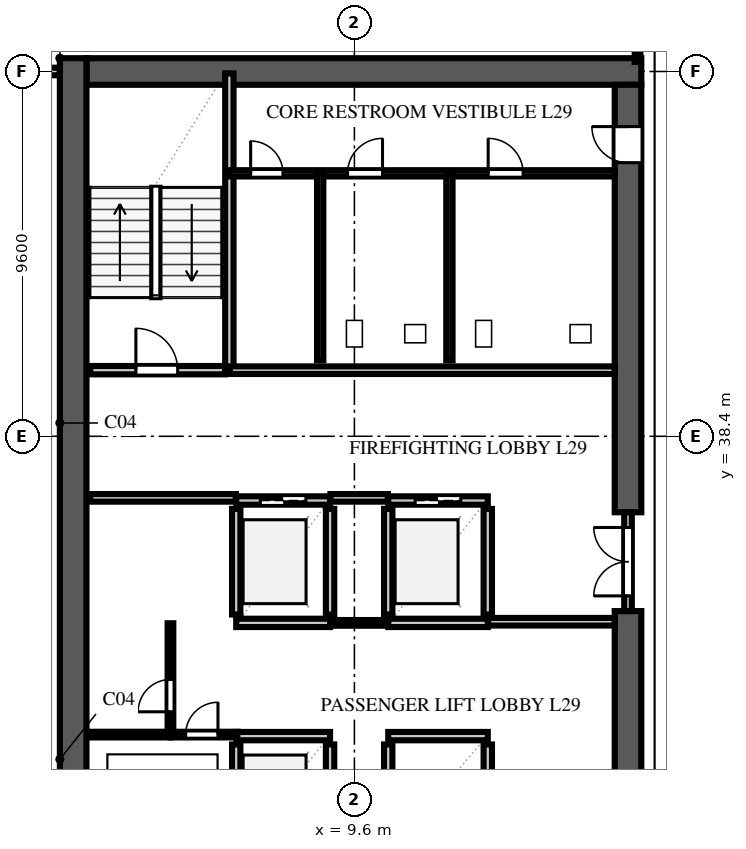
"""IFC4 building model, lengths in metres.
Left out: names, types, materials, properties, quantities, classifications, styles, units other than length and angle.
Written with IfcOpenShell. Run it as: python <this file> out.ifc"""

import sys

from ifc_helpers import new_model, si_unit, direction, frame, frame_2d, origin, place, context, subcontext, project, spatial, rectangle, extrude, element, fill, save


model = new_model("IFC4")
c1 = context("Model", 3, precision=1e-05, world=origin(), true_north=direction((0.0, 1.0)))
c2 = subcontext(c1, "Body", "Model", "MODEL_VIEW")
j1 = project(units=[si_unit("LENGTHUNIT", "METRE"), si_unit("PLANEANGLEUNIT", "RADIAN")], contexts=[c1])
p1 = place(None, origin())
s1 = spatial("IfcSite", under=j1, at=p1, CompositionType="ELEMENT")
p2 = place(p1, origin())
s2 = spatial("IfcBuilding", under=s1, at=p2, CompositionType="ELEMENT")
p3 = place(p2, frame((0.0, 0.0, 116.6)))
s3 = spatial("IfcBuildingStorey", under=s2, at=p3, CompositionType="ELEMENT", Elevation=116.6)
p4 = place(p3, frame((2.55, 48.0, 0.0), z_axis=(0.0, 0.0, 1.0), x_axis=(1.0, 0.0, 0.0)))
e1 = element("IfcWall", 1, at=p4, inside=s3, PredefinedType="SHEAR", context=c2, shape_type="SweptSolid", body=[
    extrude(rectangle(XDim=14.6, YDim=0.7, at=frame_2d((7.3, 0.0))), origin(), (0.0, 0.0, 1.0), 3.54),
])
p5 = place(p3, frame((2.2, 9.25, 0.0), z_axis=(0.0, 0.0, 1.0), x_axis=(0.0, 1.0, 0.0)))
e2 = element("IfcWall", 2, at=p5, inside=s3, PredefinedType="SHEAR", context=c2, shape_type="SweptSolid", body=[
    extrude(rectangle(XDim=39.1, YDim=0.7, at=frame_2d((19.55, 0.0))), origin(), (0.0, 0.0, 1.0), 3.54),
])
p6 = place(p3, frame((16.8, 26.0, 0.0), z_axis=(0.0, 0.0, 1.0), x_axis=(0.0, 1.0, 0.0)))
e3 = element("IfcWall", 3, at=p6, inside=s3, PredefinedType="SHEAR", context=c2, shape_type="SweptSolid", body=[
    extrude(rectangle(XDim=7.8, YDim=0.7, at=frame_2d((3.9, 0.0))), origin(), (0.0, 0.0, 1.0), 3.54),
])
p7 = place(p3, frame((16.8, 36.4, 0.0), z_axis=(0.0, 0.0, 1.0), x_axis=(0.0, 1.0, 0.0)))
e4 = element("IfcWall", 4, at=p7, inside=s3, PredefinedType="SHEAR", context=c2, shape_type="SweptSolid", body=[
    extrude(rectangle(XDim=11.25, YDim=0.7, at=frame_2d((5.625, 0.0))), origin(), (0.0, 0.0, 1.0), 3.54),
])
p8 = place(p7, frame((9.2, 0.0, 0.0)))
e5 = element("IfcOpeningElement", 5, at=p8, cuts=e4, PredefinedType="OPENING", context=c2, shape_type="SweptSolid", body=[
    extrude(rectangle(XDim=0.95, YDim=2.15, at=frame_2d((0.475, 1.075))), frame((0.0, 0.362, 0.0), z_axis=(0.0, -1.0, 0.0), x_axis=(1.0, 0.0, 0.0)), (0.0, 0.0, 1.0), 0.724),
])
p9 = place(p3, frame((2.65, 40.14, 0.0), z_axis=(0.0, 0.0, 1.0), x_axis=(1.0, 0.0, 0.0)))
e6 = element("IfcWall", 6, at=p9, inside=s3, PredefinedType="SOLIDWALL", context=c2, shape_type="SweptSolid", body=[
    extrude(rectangle(XDim=3.55, YDim=0.22, at=frame_2d((1.775, 0.0))), origin(), (0.0, 0.0, 1.0), 3.54),
])
p10 = place(p9, frame((1.2, 0.0, 0.0)))
e7 = element("IfcOpeningElement", 7, at=p10, cuts=e6, PredefinedType="OPENING", context=c2, shape_type="SweptSolid", body=[
    extrude(rectangle(XDim=1.1, YDim=2.2, at=frame_2d((0.55, 1.1))), frame((0.0, 0.122, 0.0), z_axis=(0.0, -1.0, 0.0), x_axis=(1.0, 0.0, 0.0)), (0.0, 0.0, 1.0), 0.244),
])
p11 = place(p3, frame((6.31, 40.14, 0.0), z_axis=(0.0, 0.0, 1.0), x_axis=(0.0, 1.0, 0.0)))
e8 = element("IfcWall", 8, at=p11, inside=s3, PredefinedType="SOLIDWALL", context=c2, shape_type="SweptSolid", body=[
    extrude(rectangle(XDim=7.81, YDim=0.22, at=frame_2d((3.905, 0.0))), origin(), (0.0, 0.0, 1.0), 3.54),
])
p12 = place(p3, frame((6.49, 27.71, 0.0), z_axis=(0.0, 0.0, 1.0), x_axis=(0.0, 1.0, 0.0)))
e9 = element("IfcWall", 9, at=p12, inside=s3, PredefinedType="SOLIDWALL", context=c2, shape_type="SweptSolid", body=[
    extrude(rectangle(XDim=2.58, YDim=0.22, at=frame_2d((1.29, 0.0))), origin(), (0.0, 0.0, 1.0), 3.54),
])
p13 = place(p3, frame((8.96, 27.71, 0.0), z_axis=(0.0, 0.0, 1.0), x_axis=(0.0, 1.0, 0.0)))
e10 = element("IfcWall", 10, at=p13, inside=s3, PredefinedType="SOLIDWALL", context=c2, shape_type="SweptSolid", body=[
    extrude(rectangle(XDim=2.58, YDim=0.22, at=frame_2d((1.29, 0.0))), origin(), (0.0, 0.0, 1.0), 3.54),
])
p14 = place(p13, frame((0.74, 0.0, 0.0)))
e11 = element("IfcOpeningElement", 11, at=p14, cuts=e10, PredefinedType="OPENING", context=c2, shape_type="SweptSolid", body=[
    extrude(rectangle(XDim=1.1, YDim=2.2, at=frame_2d((0.55, 1.1))), frame((0.0, 0.122, 0.0), z_axis=(0.0, -1.0, 0.0), x_axis=(1.0, 0.0, 0.0)), (0.0, 0.0, 1.0), 0.244),
])
p15 = place(p3, frame((6.49, 30.51, 0.0), z_axis=(0.0, 0.0, 1.0), x_axis=(1.0, 0.0, 0.0)))
e12 = element("IfcWall", 12, at=p15, inside=s3, PredefinedType="SOLIDWALL", context=c2, shape_type="SweptSolid", body=[
    extrude(rectangle(XDim=2.47, YDim=0.22, at=frame_2d((1.235, 0.0))), origin(), (0.0, 0.0, 1.0), 3.54),
])
for number, where, z_axis, x_axis in (
    (13, (10.49, 27.71, 0.0), (0.0, 0.0, 1.0), (0.0, 1.0, 0.0)),
    (14, (13.11, 27.71, 0.0), (0.0, 0.0, 1.0), (0.0, 1.0, 0.0)),
):
    element("IfcWall", number, at=place(p3, frame(where, z_axis=z_axis, x_axis=x_axis)), inside=s3, PredefinedType="SOLIDWALL", context=c2, shape_type="SweptSolid", body=[
        extrude(rectangle(XDim=2.58, YDim=0.22, at=frame_2d((1.29, 0.0))), origin(), (0.0, 0.0, 1.0), 3.54),
    ])
p16 = place(p3, frame((10.49, 30.51, 0.0), z_axis=(0.0, 0.0, 1.0), x_axis=(1.0, 0.0, 0.0)))
e15 = element("IfcWall", 15, at=p16, inside=s3, PredefinedType="SOLIDWALL", context=c2, shape_type="SweptSolid", body=[
    extrude(rectangle(XDim=2.62, YDim=0.22, at=frame_2d((1.31, 0.0))), origin(), (0.0, 0.0, 1.0), 3.54),
])
for number, where, z_axis, x_axis in (
    (16, (6.49, 33.71, 0.0), (0.0, 0.0, 1.0), (0.0, 1.0, 0.0)),
    (17, (8.96, 33.71, 0.0), (0.0, 0.0, 1.0), (0.0, 1.0, 0.0)),
):
    element("IfcWall", number, at=place(p3, frame(where, z_axis=z_axis, x_axis=x_axis)), inside=s3, PredefinedType="SOLIDWALL", context=c2, shape_type="SweptSolid", body=[
        extrude(rectangle(XDim=2.78, YDim=0.22, at=frame_2d((1.39, 0.0))), origin(), (0.0, 0.0, 1.0), 3.54),
    ])
p17 = place(p3, frame((6.49, 33.49, 0.0), z_axis=(0.0, 0.0, 1.0), x_axis=(1.0, 0.0, 0.0)))
e18 = element("IfcWall", 18, at=p17, inside=s3, PredefinedType="SOLIDWALL", context=c2, shape_type="SweptSolid", body=[
    extrude(rectangle(XDim=2.47, YDim=0.22, at=frame_2d((1.235, 0.0))), origin(), (0.0, 0.0, 1.0), 3.54),
])
p18 = place(p3, frame((6.49, 36.71, 0.0), z_axis=(0.0, 0.0, 1.0), x_axis=(1.0, 0.0, 0.0)))
e19 = element("IfcWall", 19, at=p18, inside=s3, PredefinedType="SOLIDWALL", context=c2, shape_type="SweptSolid", body=[
    extrude(rectangle(XDim=2.47, YDim=0.22, at=frame_2d((1.235, 0.0))), origin(), (0.0, 0.0, 1.0), 3.54),
])
p19 = place(p18, frame((0.635, 0.0, 0.0)))
e20 = element("IfcOpeningElement", 20, at=p19, cuts=e19, PredefinedType="OPENING", context=c2, shape_type="SweptSolid", body=[
    extrude(rectangle(XDim=1.2, YDim=2.2, at=frame_2d((0.6, 1.1))), frame((0.0, 0.122, 0.0), z_axis=(0.0, -1.0, 0.0), x_axis=(1.0, 0.0, 0.0)), (0.0, 0.0, 1.0), 0.244),
])
for number, where, z_axis, x_axis in (
    (21, (10.49, 33.71, 0.0), (0.0, 0.0, 1.0), (0.0, 1.0, 0.0)),
    (22, (13.11, 33.71, 0.0), (0.0, 0.0, 1.0), (0.0, 1.0, 0.0)),
):
    element("IfcWall", number, at=place(p3, frame(where, z_axis=z_axis, x_axis=x_axis)), inside=s3, PredefinedType="SOLIDWALL", context=c2, shape_type="SweptSolid", body=[
        extrude(rectangle(XDim=2.78, YDim=0.22, at=frame_2d((1.39, 0.0))), origin(), (0.0, 0.0, 1.0), 3.54),
    ])
p20 = place(p3, frame((10.49, 33.49, 0.0), z_axis=(0.0, 0.0, 1.0), x_axis=(1.0, 0.0, 0.0)))
e23 = element("IfcWall", 23, at=p20, inside=s3, PredefinedType="SOLIDWALL", context=c2, shape_type="SweptSolid", body=[
    extrude(rectangle(XDim=2.62, YDim=0.22, at=frame_2d((1.31, 0.0))), origin(), (0.0, 0.0, 1.0), 3.54),
])
p21 = place(p3, frame((10.49, 36.71, 0.0), z_axis=(0.0, 0.0, 1.0), x_axis=(1.0, 0.0, 0.0)))
e24 = element("IfcWall", 24, at=p21, inside=s3, PredefinedType="SOLIDWALL", context=c2, shape_type="SweptSolid", body=[
    extrude(rectangle(XDim=2.62, YDim=0.22, at=frame_2d((1.31, 0.0))), origin(), (0.0, 0.0, 1.0), 3.54),
])
p22 = place(p21, frame((0.71, 0.0, 0.0)))
e25 = element("IfcOpeningElement", 25, at=p22, cuts=e24, PredefinedType="OPENING", context=c2, shape_type="SweptSolid", body=[
    extrude(rectangle(XDim=1.2, YDim=2.2, at=frame_2d((0.6, 1.1))), frame((0.0, 0.122, 0.0), z_axis=(0.0, -1.0, 0.0), x_axis=(1.0, 0.0, 0.0)), (0.0, 0.0, 1.0), 0.244),
])
p23 = place(p3, frame((2.65, 36.78, 0.0), z_axis=(0.0, 0.0, 1.0), x_axis=(1.0, 0.0, 0.0)))
e26 = element("IfcWall", 26, at=p23, inside=s3, PredefinedType="SOLIDWALL", context=c2, shape_type="SweptSolid", body=[
    extrude(rectangle(XDim=3.83, YDim=0.2, at=frame_2d((1.915, 0.0))), origin(), (0.0, 0.0, 1.0), 3.54),
])
p24 = place(p3, frame((8.97, 36.78, 0.0), z_axis=(0.0, 0.0, 1.0), x_axis=(1.0, 0.0, 0.0)))
e27 = element("IfcWall", 27, at=p24, inside=s3, PredefinedType="SOLIDWALL", context=c2, shape_type="SweptSolid", body=[
    extrude(rectangle(XDim=1.51, YDim=0.2, at=frame_2d((0.755, 0.0))), origin(), (0.0, 0.0, 1.0), 3.54),
])
p25 = place(p3, frame((13.12, 33.52, 0.0), z_axis=(0.0, 0.0, 1.0), x_axis=(1.0, 0.0, 0.0)))
e28 = element("IfcWall", 28, at=p25, inside=s3, PredefinedType="SOLIDWALL", context=c2, shape_type="SweptSolid", body=[
    extrude(rectangle(XDim=3.33, YDim=0.2, at=frame_2d((1.665, 0.0))), origin(), (0.0, 0.0, 1.0), 3.54),
])
p26 = place(p3, frame((6.32, 40.14, 0.0), z_axis=(0.0, 0.0, 1.0), x_axis=(1.0, 0.0, 0.0)))
e29 = element("IfcWall", 29, at=p26, inside=s3, PredefinedType="SOLIDWALL", context=c2, shape_type="SweptSolid", body=[
    extrude(rectangle(XDim=10.13, YDim=0.2, at=frame_2d((5.065, 0.0))), origin(), (0.0, 0.0, 1.0), 3.54),
])
p27 = place(p3, frame((16.8, 33.8, 0.0), z_axis=(0.0, 0.0, 1.0), x_axis=(0.0, 1.0, 0.0)))
e30 = element("IfcWall", 30, at=p27, inside=s3, PredefinedType="SOLIDWALL", context=c2, shape_type="SweptSolid", body=[
    extrude(rectangle(XDim=2.6, YDim=0.2, at=frame_2d((1.3, 0.0))), origin(), (0.0, 0.0, 1.0), 3.54),
])
p28 = place(p27, frame((0.4, 0.0, 0.0)))
e31 = element("IfcOpeningElement", 31, at=p28, cuts=e30, PredefinedType="OPENING", context=c2, shape_type="SweptSolid", body=[
    extrude(rectangle(XDim=1.8, YDim=2.2, at=frame_2d((0.9, 1.1))), frame((0.0, 0.112, 0.0), z_axis=(0.0, -1.0, 0.0), x_axis=(1.0, 0.0, 0.0)), (0.0, 0.0, 1.0), 0.224),
])
p29 = place(p3, frame((8.965, 33.49, 0.0), z_axis=(0.0, 0.0, 1.0), x_axis=(1.0, 0.0, 0.0)))
e32 = element("IfcWall", 32, at=p29, inside=s3, PredefinedType="PARTITIONING", context=c2, shape_type="SweptSolid", body=[
    extrude(rectangle(XDim=1.52, YDim=0.15, at=frame_2d((0.76, 0.0))), origin(), (0.0, 0.0, 1.0), 3.54),
])
p30 = place(p3, frame((4.76, 30.55, 0.0), z_axis=(0.0, 0.0, 1.0), x_axis=(0.0, 1.0, 0.0)))
e33 = element("IfcWall", 33, at=p30, inside=s3, PredefinedType="PARTITIONING", context=c2, shape_type="SweptSolid", body=[
    extrude(rectangle(XDim=2.93, YDim=0.15, at=frame_2d((1.465, 0.0))), origin(), (0.0, 0.0, 1.0), 3.54),
])
p31 = place(p30, frame((0.6, 0.0, 0.0)))
e34 = element("IfcOpeningElement", 34, at=p31, cuts=e33, PredefinedType="OPENING", context=c2, shape_type="SweptSolid", body=[
    extrude(rectangle(XDim=0.85, YDim=2.1, at=frame_2d((0.425, 1.05))), frame((0.0, 0.087, 0.0), z_axis=(0.0, -1.0, 0.0), x_axis=(1.0, 0.0, 0.0)), (0.0, 0.0, 1.0), 0.174),
])
p32 = place(p3, frame((4.76, 30.55, 0.0), z_axis=(0.0, 0.0, 1.0), x_axis=(1.0, 0.0, 0.0)))
e35 = element("IfcWall", 35, at=p32, inside=s3, PredefinedType="PARTITIONING", context=c2, shape_type="SweptSolid", body=[
    extrude(rectangle(XDim=1.76, YDim=0.15, at=frame_2d((0.88, 0.0))), origin(), (0.0, 0.0, 1.0), 3.54),
])
p33 = place(p32, frame((0.4, 0.0, 0.0)))
e36 = element("IfcOpeningElement", 36, at=p33, cuts=e35, PredefinedType="OPENING", context=c2, shape_type="SweptSolid", body=[
    extrude(rectangle(XDim=0.85, YDim=2.1, at=frame_2d((0.425, 1.05))), frame((0.0, 0.087, 0.0), z_axis=(0.0, -1.0, 0.0), x_axis=(1.0, 0.0, 0.0)), (0.0, 0.0, 1.0), 0.174),
])
p34 = place(p3, frame((2.65, 30.55, 0.0), z_axis=(0.0, 0.0, 1.0), x_axis=(1.0, 0.0, 0.0)))
e37 = element("IfcWall", 37, at=p34, inside=s3, PredefinedType="PARTITIONING", context=c2, shape_type="SweptSolid", body=[
    extrude(rectangle(XDim=2.11, YDim=0.15, at=frame_2d((1.055, 0.0))), origin(), (0.0, 0.0, 1.0), 3.54),
])
p35 = place(p3, frame((6.32, 45.32, 0.0), z_axis=(0.0, 0.0, 1.0), x_axis=(1.0, 0.0, 0.0)))
e38 = element("IfcWall", 38, at=p35, inside=s3, PredefinedType="PLUMBINGWALL", context=c2, shape_type="SweptSolid", body=[
    extrude(rectangle(XDim=10.13, YDim=0.165, at=frame_2d((5.065, 0.0))), origin(), (0.0, 0.0, 1.0), 3.54),
])
p36 = place(p35, frame((0.55, 0.0, 0.0)))
e39 = element("IfcOpeningElement", 39, at=p36, cuts=e38, PredefinedType="OPENING", context=c2, shape_type="SweptSolid", body=[
    extrude(rectangle(XDim=0.85, YDim=2.1, at=frame_2d((0.425, 1.05))), frame((0.0, 0.094, 0.0), z_axis=(0.0, -1.0, 0.0), x_axis=(1.0, 0.0, 0.0)), (0.0, 0.0, 1.0), 0.189),
])
p37 = place(p35, frame((3.1, 0.0, 0.0)))
e40 = element("IfcOpeningElement", 40, at=p37, cuts=e38, PredefinedType="OPENING", context=c2, shape_type="SweptSolid", body=[
    extrude(rectangle(XDim=0.92, YDim=2.15, at=frame_2d((0.46, 1.075))), frame((0.0, 0.094, 0.0), z_axis=(0.0, -1.0, 0.0), x_axis=(1.0, 0.0, 0.0)), (0.0, 0.0, 1.0), 0.189),
])
p38 = place(p35, frame((6.8, 0.0, 0.0)))
e41 = element("IfcOpeningElement", 41, at=p38, cuts=e38, PredefinedType="OPENING", context=c2, shape_type="SweptSolid", body=[
    extrude(rectangle(XDim=0.92, YDim=2.15, at=frame_2d((0.46, 1.075))), frame((0.0, 0.094, 0.0), z_axis=(0.0, -1.0, 0.0), x_axis=(1.0, 0.0, 0.0)), (0.0, 0.0, 1.0), 0.189),
])
for number, where, z_axis, x_axis in (
    (42, (8.7, 40.4, 0.0), (0.0, 0.0, 1.0), (0.0, 1.0, 0.0)),
    (43, (12.1, 40.4, 0.0), (0.0, 0.0, 1.0), (0.0, 1.0, 0.0)),
):
    element("IfcWall", number, at=place(p3, frame(where, z_axis=z_axis, x_axis=x_axis)), inside=s3, PredefinedType="PLUMBINGWALL", context=c2, shape_type="SweptSolid", body=[
        extrude(rectangle(XDim=4.92, YDim=0.165, at=frame_2d((2.46, 0.0))), origin(), (0.0, 0.0, 1.0), 3.54),
    ])
p39 = place(p3, frame((0.85, 48.0, 0.0), z_axis=(0.0, 0.0, 1.0), x_axis=(1.0, 0.0, 0.0)))
e44 = element("IfcWall", 44, at=p39, inside=s3, PredefinedType="SOLIDWALL", context=c2, shape_type="SweptSolid", body=[
    extrude(rectangle(XDim=0.995, YDim=0.2, at=frame_2d((0.498, 0.0))), origin(), (0.0, 0.0, 1.0), 3.54),
])
p40 = place(p3, frame((17.05, 48.25, 0.0), z_axis=(0.0, 0.0, 1.0), x_axis=(0.0, 1.0, 0.0)))
e45 = element("IfcWall", 45, at=p40, inside=s3, PredefinedType="PARTITIONING", context=c2, shape_type="SweptSolid", body=[
    extrude(rectangle(XDim=18.73, YDim=0.15, at=frame_2d((9.365, 0.0))), origin(), (0.0, 0.0, 1.0), 3.54),
])
p41 = place(p40, frame((3.4, 0.0, 0.0)))
e46 = element("IfcOpeningElement", 46, at=p41, cuts=e45, PredefinedType="OPENING", context=c2, shape_type="SweptSolid", body=[
    extrude(rectangle(XDim=0.95, YDim=2.15, at=frame_2d((0.475, 1.075))), frame((0.0, 0.087, 0.0), z_axis=(0.0, -1.0, 0.0), x_axis=(1.0, 0.0, 0.0)), (0.0, 0.0, 1.0), 0.174),
])
p42 = place(p10, origin())
e47 = element("IfcDoor", 47, at=p42, inside=s3, OperationType="SINGLE_SWING_LEFT", PredefinedType="DOOR", context=c2, shape_type="SweptSolid", body=[
    extrude(rectangle(XDim=1.1, YDim=2.2, at=frame_2d((0.55, 1.1))), frame((0.0, 0.025, 0.0), z_axis=(0.0, -1.0, 0.0), x_axis=(1.0, 0.0, 0.0)), (0.0, 0.0, 1.0), 0.05),
])
fill(e7, e47)
p43 = place(p19, origin())
e48 = element("IfcDoor", 48, at=p43, inside=s3, OperationType="DOUBLE_DOOR_SLIDING", PredefinedType="DOOR", context=c2, shape_type="SweptSolid", body=[
    extrude(rectangle(XDim=1.2, YDim=2.2, at=frame_2d((0.6, 1.1))), frame((0.0, 0.025, 0.0), z_axis=(0.0, -1.0, 0.0), x_axis=(1.0, 0.0, 0.0)), (0.0, 0.0, 1.0), 0.05),
])
fill(e20, e48)
p44 = place(p22, origin())
e49 = element("IfcDoor", 49, at=p44, inside=s3, OperationType="DOUBLE_DOOR_SLIDING", PredefinedType="DOOR", context=c2, shape_type="SweptSolid", body=[
    extrude(rectangle(XDim=1.2, YDim=2.2, at=frame_2d((0.6, 1.1))), frame((0.0, 0.025, 0.0), z_axis=(0.0, -1.0, 0.0), x_axis=(1.0, 0.0, 0.0)), (0.0, 0.0, 1.0), 0.05),
])
fill(e25, e49)
p45 = place(p8, origin())
e50 = element("IfcDoor", 50, at=p45, inside=s3, OperationType="SINGLE_SWING_RIGHT", PredefinedType="DOOR", context=c2, shape_type="SweptSolid", body=[
    extrude(rectangle(XDim=0.95, YDim=2.15, at=frame_2d((0.475, 1.075))), frame((0.0, 0.025, 0.0), z_axis=(0.0, -1.0, 0.0), x_axis=(1.0, 0.0, 0.0)), (0.0, 0.0, 1.0), 0.05),
])
fill(e5, e50)
p46 = place(p28, origin())
e51 = element("IfcDoor", 51, at=p46, inside=s3, OperationType="DOUBLE_DOOR_SINGLE_SWING", PredefinedType="DOOR", context=c2, shape_type="SweptSolid", body=[
    extrude(rectangle(XDim=1.8, YDim=2.2, at=frame_2d((0.9, 1.1))), frame((0.0, 0.025, 0.0), z_axis=(0.0, -1.0, 0.0), x_axis=(1.0, 0.0, 0.0)), (0.0, 0.0, 1.0), 0.05),
])
fill(e31, e51)
p47 = place(p31, origin())
e52 = element("IfcDoor", 52, at=p47, inside=s3, OperationType="SINGLE_SWING_LEFT", PredefinedType="DOOR", context=c2, shape_type="SweptSolid", body=[
    extrude(rectangle(XDim=0.85, YDim=2.1, at=frame_2d((0.425, 1.05))), frame((0.0, 0.025, 0.0), z_axis=(0.0, -1.0, 0.0), x_axis=(1.0, 0.0, 0.0)), (0.0, 0.0, 1.0), 0.05),
])
fill(e34, e52)
p48 = place(p33, origin())
e53 = element("IfcDoor", 53, at=p48, inside=s3, OperationType="SINGLE_SWING_RIGHT", PredefinedType="DOOR", context=c2, shape_type="SweptSolid", body=[
    extrude(rectangle(XDim=0.85, YDim=2.1, at=frame_2d((0.425, 1.05))), frame((0.0, 0.025, 0.0), z_axis=(0.0, -1.0, 0.0), x_axis=(1.0, 0.0, 0.0)), (0.0, 0.0, 1.0), 0.05),
])
fill(e36, e53)
p49 = place(p36, origin())
e54 = element("IfcDoor", 54, at=p49, inside=s3, OperationType="SINGLE_SWING_LEFT", PredefinedType="DOOR", context=c2, shape_type="SweptSolid", body=[
    extrude(rectangle(XDim=0.85, YDim=2.1, at=frame_2d((0.425, 1.05))), frame((0.0, 0.025, 0.0), z_axis=(0.0, -1.0, 0.0), x_axis=(1.0, 0.0, 0.0)), (0.0, 0.0, 1.0), 0.05),
])
fill(e39, e54)
p50 = place(p37, origin())
e55 = element("IfcDoor", 55, at=p50, inside=s3, OperationType="SINGLE_SWING_RIGHT", PredefinedType="DOOR", context=c2, shape_type="SweptSolid", body=[
    extrude(rectangle(XDim=0.92, YDim=2.15, at=frame_2d((0.46, 1.075))), frame((0.0, 0.025, 0.0), z_axis=(0.0, -1.0, 0.0), x_axis=(1.0, 0.0, 0.0)), (0.0, 0.0, 1.0), 0.05),
])
fill(e40, e55)
p51 = place(p38, origin())
e56 = element("IfcDoor", 56, at=p51, inside=s3, OperationType="SINGLE_SWING_LEFT", PredefinedType="DOOR", context=c2, shape_type="SweptSolid", body=[
    extrude(rectangle(XDim=0.92, YDim=2.15, at=frame_2d((0.46, 1.075))), frame((0.0, 0.025, 0.0), z_axis=(0.0, -1.0, 0.0), x_axis=(1.0, 0.0, 0.0)), (0.0, 0.0, 1.0), 0.05),
])
fill(e41, e56)
save(model, sys.argv[1])
